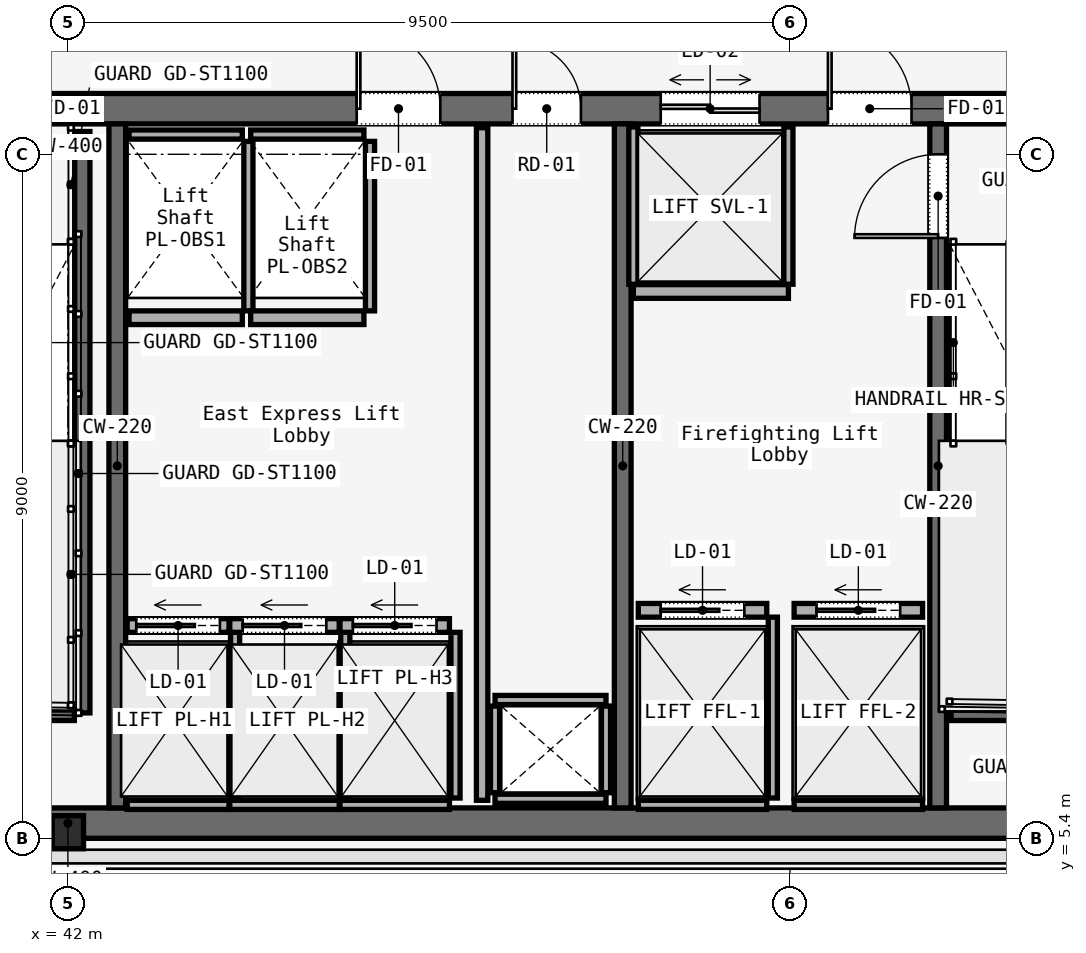
"""IFC4 building model, lengths in metres.
Left out: names, types, materials, properties, quantities, classifications, styles, units other than length and angle.
Written with IfcOpenShell. Run it as: python <this file> out.ifc"""

import sys

from ifc_helpers import new_model, si_unit, direction, frame, frame_2d, origin, origin_2d, place, context, subcontext, project, spatial, rectangle, i_section, extrude, element, fill, save


model = new_model("IFC4")
c1 = context("Model", 3, precision=1e-05, world=origin(), true_north=direction((0.0, 1.0)))
c2 = subcontext(c1, "Body", "Model", "MODEL_VIEW")
j1 = project(units=[si_unit("LENGTHUNIT", "METRE"), si_unit("PLANEANGLEUNIT", "RADIAN")], contexts=[c1])
p1 = place(None, origin())
s1 = spatial("IfcSite", under=j1, at=p1, CompositionType="ELEMENT")
p2 = place(p1, origin())
s2 = spatial("IfcBuilding", under=s1, at=p2, CompositionType="ELEMENT")
p3 = place(p2, frame((0.0, 0.0, 221.8)))
s3 = spatial("IfcBuildingStorey", under=s2, at=p3, CompositionType="ELEMENT", Elevation=221.8)
p4 = place(p3, frame((26.45, 15.0, 0.0), z_axis=(0.0, 0.0, 1.0), x_axis=(1.0, 0.0, 0.0)))
e1 = element("IfcWall", 1, at=p4, inside=s3, PredefinedType="SOLIDWALL", context=c2, shape_type="SweptSolid", body=[
    extrude(rectangle(XDim=31.1, YDim=0.4, at=frame_2d((15.55, 0.0))), origin(), (0.0, 0.0, 1.0), 3.58),
])
p5 = place(p4, frame((1.65, 0.0, 0.0)))
e2 = element("IfcOpeningElement", 2, at=p5, cuts=e1, PredefinedType="OPENING", context=c2, shape_type="SweptSolid", body=[
    extrude(rectangle(XDim=1.1, YDim=2.2, at=frame_2d((0.55, 1.1))), frame((0.0, 0.2, 0.0), z_axis=(0.0, -1.0, 0.0), x_axis=(1.0, 0.0, 0.0)), (0.0, 0.0, 1.0), 0.4),
])
p6 = place(p4, frame((13.65, 0.0, 0.0)))
e3 = element("IfcOpeningElement", 3, at=p6, cuts=e1, PredefinedType="OPENING", context=c2, shape_type="SweptSolid", body=[
    extrude(rectangle(XDim=1.1, YDim=2.2, at=frame_2d((0.55, 1.1))), frame((0.0, 0.2, 0.0), z_axis=(0.0, -1.0, 0.0), x_axis=(1.0, 0.0, 0.0)), (0.0, 0.0, 1.0), 0.4),
])
p7 = place(p4, frame((25.55, 0.0, 0.0)))
e4 = element("IfcOpeningElement", 4, at=p7, cuts=e1, PredefinedType="OPENING", context=c2, shape_type="SweptSolid", body=[
    extrude(rectangle(XDim=1.1, YDim=2.2, at=frame_2d((0.55, 1.1))), frame((0.0, 0.2, 0.0), z_axis=(0.0, -1.0, 0.0), x_axis=(1.0, 0.0, 0.0)), (0.0, 0.0, 1.0), 0.4),
])
p8 = place(p4, frame((19.35, 0.0, 0.0)))
e5 = element("IfcOpeningElement", 5, at=p8, cuts=e1, PredefinedType="OPENING", context=c2, shape_type="SweptSolid", body=[
    extrude(rectangle(XDim=1.1, YDim=2.2, at=frame_2d((0.55, 1.1))), frame((0.0, 0.2, 0.0), z_axis=(0.0, -1.0, 0.0), x_axis=(1.0, 0.0, 0.0)), (0.0, 0.0, 1.0), 0.4),
])
p9 = place(p4, frame((21.4, 0.0, 0.0)))
e6 = element("IfcOpeningElement", 6, at=p9, cuts=e1, PredefinedType="OPENING", context=c2, shape_type="SweptSolid", body=[
    extrude(rectangle(XDim=0.9, YDim=2.1, at=frame_2d((0.45, 1.05))), frame((0.0, 0.2, 0.0), z_axis=(0.0, -1.0, 0.0), x_axis=(1.0, 0.0, 0.0)), (0.0, 0.0, 1.0), 0.4),
])
p10 = place(p4, frame((6.54, 0.0, 0.0)))
e7 = element("IfcOpeningElement", 7, at=p10, cuts=e1, PredefinedType="OPENING", context=c2, shape_type="SweptSolid", body=[
    extrude(rectangle(XDim=0.95, YDim=2.2, at=frame_2d((0.475, 1.1))), frame((0.0, 0.2, 0.0), z_axis=(0.0, -1.0, 0.0), x_axis=(1.0, 0.0, 0.0)), (0.0, 0.0, 1.0), 0.4),
])
p11 = place(p4, frame((10.49, 0.0, 0.0)))
e8 = element("IfcOpeningElement", 8, at=p11, cuts=e1, PredefinedType="OPENING", context=c2, shape_type="SweptSolid", body=[
    extrude(rectangle(XDim=0.95, YDim=2.2, at=frame_2d((0.475, 1.1))), frame((0.0, 0.2, 0.0), z_axis=(0.0, -1.0, 0.0), x_axis=(1.0, 0.0, 0.0)), (0.0, 0.0, 1.0), 0.4),
])
p12 = place(p4, frame((23.35, 0.0, 0.0)))
e9 = element("IfcOpeningElement", 9, at=p12, cuts=e1, PredefinedType="OPENING", context=c2, shape_type="SweptSolid", body=[
    extrude(rectangle(XDim=1.3, YDim=2.3, at=frame_2d((0.65, 1.15))), frame((0.0, 0.2, 0.0), z_axis=(0.0, -1.0, 0.0), x_axis=(1.0, 0.0, 0.0)), (0.0, 0.0, 1.0), 0.4),
])
p13 = place(p3, frame((26.45, 5.6, 0.0), z_axis=(0.0, 0.0, 1.0), x_axis=(1.0, 0.0, 0.0)))
e10 = element("IfcWall", 10, at=p13, inside=s3, PredefinedType="SOLIDWALL", context=c2, shape_type="SweptSolid", body=[
    extrude(rectangle(XDim=31.1, YDim=0.4, at=frame_2d((15.55, 0.0))), origin(), (0.0, 0.0, 1.0), 3.58),
])
for number, where, z_axis, x_axis in (
    (11, (42.65, 5.8, 0.0), (0.0, 0.0, 1.0), (0.0, 1.0, 0.0)),
    (12, (49.3, 5.8, 0.0), (0.0, 0.0, 1.0), (0.0, 1.0, 0.0)),
):
    element("IfcWall", number, at=place(p3, frame(where, z_axis=z_axis, x_axis=x_axis)), inside=s3, PredefinedType="SOLIDWALL", context=c2, shape_type="SweptSolid", body=[
        extrude(rectangle(XDim=9.0, YDim=0.22, at=frame_2d((4.5, 0.0))), origin(), (0.0, 0.0, 1.0), 3.58),
    ])
p14 = place(p3, frame((53.45, 5.8, 0.0), z_axis=(0.0, 0.0, 1.0), x_axis=(0.0, 1.0, 0.0)))
e13 = element("IfcWall", 13, at=p14, inside=s3, PredefinedType="SOLIDWALL", context=c2, shape_type="SweptSolid", body=[
    extrude(rectangle(XDim=9.0, YDim=0.22, at=frame_2d((4.5, 0.0))), origin(), (0.0, 0.0, 1.0), 3.58),
])
p15 = place(p14, frame((7.5, 0.0, 0.0)))
e14 = element("IfcOpeningElement", 14, at=p15, cuts=e13, PredefinedType="OPENING", context=c2, shape_type="SweptSolid", body=[
    extrude(rectangle(XDim=1.1, YDim=2.2, at=frame_2d((0.55, 1.1))), frame((0.0, 0.11, 0.0), z_axis=(0.0, -1.0, 0.0), x_axis=(1.0, 0.0, 0.0)), (0.0, 0.0, 1.0), 0.22),
])
p16 = place(p3, frame((42.0, 5.48, 0.0), z_axis=(0.0, 0.0, 1.0), x_axis=(1.0, 0.0, 0.0)))
e15 = element("IfcColumn", 15, at=p16, inside=s3, PredefinedType="COLUMN", context=c2, shape_type="SweptSolid", body=[
    extrude(i_section(OverallWidth=0.412, OverallDepth=0.435, WebThickness=0.036, FlangeThickness=0.044, FilletRadius=0.015, at=origin_2d()), origin(), (0.0, 0.0, 1.0), 3.58),
])
p17 = place(p3, frame((42.19, 14.7, 0.0), z_axis=(0.0, 0.0, 1.0), x_axis=(0.0, -1.0, 0.0)))
e16 = element("IfcWall", 16, at=p17, inside=s3, PredefinedType="SOLIDWALL", context=c2, shape_type="SweptSolid", body=[
    extrude(rectangle(XDim=7.65, YDim=0.2, at=frame_2d((3.825, 0.0))), origin(), (0.0, 0.0, 1.0), 3.8),
])
for number, where, z_axis, x_axis in (
    (17, (38.97, 7.05, 0.0), (0.0, 0.0, 1.0), (1.0, 0.0, 0.0)),
    (18, (53.62, 7.05, 0.0), (0.0, 0.0, 1.0), (1.0, 0.0, 0.0)),
):
    element("IfcWall", number, at=place(p3, frame(where, z_axis=z_axis, x_axis=x_axis)), inside=s3, PredefinedType="SOLIDWALL", context=c2, shape_type="SweptSolid", body=[
        extrude(rectangle(XDim=3.115, YDim=0.2, at=frame_2d((1.558, 0.0))), origin(), (0.0, 0.0, 1.0), 3.8),
    ])
for number, where, z_axis, x_axis in (
    (19, (47.62, 5.92, 0.0), (0.0, 0.0, 1.0), (1.0, 0.0, 0.0)),
    (20, (47.62, 7.22, 0.0), (0.0, 0.0, 1.0), (1.0, 0.0, 0.0)),
):
    element("IfcWall", number, at=place(p3, frame(where, z_axis=z_axis, x_axis=x_axis)), inside=s3, PredefinedType="SOLIDWALL", context=c2, shape_type="SweptSolid", body=[
        extrude(rectangle(XDim=1.46, YDim=0.12, at=frame_2d((0.73, 0.0))), origin(), (0.0, 0.0, 1.0), 3.01),
    ])
for number, where, z_axis, x_axis in (
    (21, (47.62, 6.0, 0.0), (0.0, 0.0, 1.0), (0.0, 1.0, 0.0)),
    (22, (49.08, 6.0, 0.0), (0.0, 0.0, 1.0), (0.0, 1.0, 0.0)),
):
    element("IfcWall", number, at=place(p3, frame(where, z_axis=z_axis, x_axis=x_axis)), inside=s3, PredefinedType="SOLIDWALL", context=c2, shape_type="SweptSolid", body=[
        extrude(rectangle(XDim=1.14, YDim=0.12, at=frame_2d((0.57, 0.0))), origin(), (0.0, 0.0, 1.0), 3.01),
    ])
p18 = place(p3, frame((47.45, 5.9, 0.0), z_axis=(0.0, 0.0, 1.0), x_axis=(0.0, 1.0, 0.0)))
e23 = element("IfcWall", 23, at=p18, inside=s3, PredefinedType="PARTITIONING", context=c2, shape_type="SweptSolid", body=[
    extrude(rectangle(XDim=8.85, YDim=0.15, at=frame_2d((4.425, 0.0))), origin(), (0.0, 0.0, 1.0), 3.01),
])
p19 = place(p3, frame((42.78, 8.2, 0.0), z_axis=(0.0, 0.0, 1.0), x_axis=(1.0, 0.0, 0.0)))
e24 = element("IfcWall", 24, at=p19, inside=s3, PredefinedType="SOLIDWALL", context=c2, shape_type="SweptSolid", body=[
    extrude(rectangle(XDim=1.34, YDim=0.18, at=frame_2d((0.67, 0.0))), origin(), (0.0, 0.0, 1.0), 3.01),
])
p20 = place(p19, frame((0.12, 0.0, 0.0)))
e25 = element("IfcOpeningElement", 25, at=p20, cuts=e24, PredefinedType="OPENING", context=c2, shape_type="SweptSolid", body=[
    extrude(rectangle(XDim=1.1, YDim=2.2, at=frame_2d((0.55, 1.1))), frame((0.0, 0.09, 0.0), z_axis=(0.0, -1.0, 0.0), x_axis=(1.0, 0.0, 0.0)), (0.0, 0.0, 1.0), 0.18),
])
p21 = place(p3, frame((42.78, 5.84, 0.0), z_axis=(0.0, 0.0, 1.0), x_axis=(1.0, 0.0, 0.0)))
e26 = element("IfcWall", 26, at=p21, inside=s3, PredefinedType="SOLIDWALL", context=c2, shape_type="SweptSolid", body=[
    extrude(rectangle(XDim=1.34, YDim=0.12, at=frame_2d((0.67, 0.0))), origin(), (0.0, 0.0, 1.0), 3.01),
])
p22 = place(p3, frame((44.2, 5.93, 0.0), z_axis=(0.0, 0.0, 1.0), x_axis=(0.0, 1.0, 0.0)))
e27 = element("IfcWall", 27, at=p22, inside=s3, PredefinedType="SOLIDWALL", context=c2, shape_type="SweptSolid", body=[
    extrude(rectangle(XDim=2.18, YDim=0.12, at=frame_2d((1.09, 0.0))), origin(), (0.0, 0.0, 1.0), 3.01),
])
p23 = place(p3, frame((44.13, 8.2, 0.0), z_axis=(0.0, 0.0, 1.0), x_axis=(1.0, 0.0, 0.0)))
e28 = element("IfcWall", 28, at=p23, inside=s3, PredefinedType="SOLIDWALL", context=c2, shape_type="SweptSolid", body=[
    extrude(rectangle(XDim=1.44, YDim=0.18, at=frame_2d((0.72, 0.0))), origin(), (0.0, 0.0, 1.0), 3.01),
])
p24 = place(p23, frame((0.17, 0.0, 0.0)))
e29 = element("IfcOpeningElement", 29, at=p24, cuts=e28, PredefinedType="OPENING", context=c2, shape_type="SweptSolid", body=[
    extrude(rectangle(XDim=1.1, YDim=2.2, at=frame_2d((0.55, 1.1))), frame((0.0, 0.09, 0.0), z_axis=(0.0, -1.0, 0.0), x_axis=(1.0, 0.0, 0.0)), (0.0, 0.0, 1.0), 0.18),
])
p25 = place(p3, frame((44.13, 5.84, 0.0), z_axis=(0.0, 0.0, 1.0), x_axis=(1.0, 0.0, 0.0)))
e30 = element("IfcWall", 30, at=p25, inside=s3, PredefinedType="SOLIDWALL", context=c2, shape_type="SweptSolid", body=[
    extrude(rectangle(XDim=1.44, YDim=0.12, at=frame_2d((0.72, 0.0))), origin(), (0.0, 0.0, 1.0), 3.01),
])
p26 = place(p3, frame((45.65, 5.93, 0.0), z_axis=(0.0, 0.0, 1.0), x_axis=(0.0, 1.0, 0.0)))
e31 = element("IfcWall", 31, at=p26, inside=s3, PredefinedType="SOLIDWALL", context=c2, shape_type="SweptSolid", body=[
    extrude(rectangle(XDim=2.18, YDim=0.12, at=frame_2d((1.09, 0.0))), origin(), (0.0, 0.0, 1.0), 3.01),
])
p27 = place(p3, frame((45.58, 8.2, 0.0), z_axis=(0.0, 0.0, 1.0), x_axis=(1.0, 0.0, 0.0)))
e32 = element("IfcWall", 32, at=p27, inside=s3, PredefinedType="SOLIDWALL", context=c2, shape_type="SweptSolid", body=[
    extrude(rectangle(XDim=1.44, YDim=0.18, at=frame_2d((0.72, 0.0))), origin(), (0.0, 0.0, 1.0), 3.01),
])
p28 = place(p27, frame((0.17, 0.0, 0.0)))
e33 = element("IfcOpeningElement", 33, at=p28, cuts=e32, PredefinedType="OPENING", context=c2, shape_type="SweptSolid", body=[
    extrude(rectangle(XDim=1.1, YDim=2.2, at=frame_2d((0.55, 1.1))), frame((0.0, 0.09, 0.0), z_axis=(0.0, -1.0, 0.0), x_axis=(1.0, 0.0, 0.0)), (0.0, 0.0, 1.0), 0.18),
])
p29 = place(p3, frame((45.58, 5.84, 0.0), z_axis=(0.0, 0.0, 1.0), x_axis=(1.0, 0.0, 0.0)))
e34 = element("IfcWall", 34, at=p29, inside=s3, PredefinedType="SOLIDWALL", context=c2, shape_type="SweptSolid", body=[
    extrude(rectangle(XDim=1.44, YDim=0.12, at=frame_2d((0.72, 0.0))), origin(), (0.0, 0.0, 1.0), 3.01),
])
p30 = place(p3, frame((47.1, 5.93, 0.0), z_axis=(0.0, 0.0, 1.0), x_axis=(0.0, 1.0, 0.0)))
e35 = element("IfcWall", 35, at=p30, inside=s3, PredefinedType="SOLIDWALL", context=c2, shape_type="SweptSolid", body=[
    extrude(rectangle(XDim=2.18, YDim=0.12, at=frame_2d((1.09, 0.0))), origin(), (0.0, 0.0, 1.0), 3.01),
])
p31 = place(p3, frame((42.805, 12.25, 0.0), z_axis=(0.0, 0.0, 1.0), x_axis=(1.0, 0.0, 0.0)))
e36 = element("IfcWall", 36, at=p31, inside=s3, PredefinedType="SOLIDWALL", context=c2, shape_type="SweptSolid", body=[
    extrude(rectangle(XDim=1.49, YDim=0.18, at=frame_2d((0.745, 0.0))), origin(), (0.0, 0.0, 1.0), 3.01),
])
p32 = place(p3, frame((42.805, 14.66, 0.0), z_axis=(0.0, 0.0, 1.0), x_axis=(1.0, 0.0, 0.0)))
e37 = element("IfcWall", 37, at=p32, inside=s3, PredefinedType="SOLIDWALL", context=c2, shape_type="SweptSolid", body=[
    extrude(rectangle(XDim=1.49, YDim=0.12, at=frame_2d((0.745, 0.0))), origin(), (0.0, 0.0, 1.0), 3.01),
])
p33 = place(p3, frame((44.375, 12.34, 0.0), z_axis=(0.0, 0.0, 1.0), x_axis=(0.0, 1.0, 0.0)))
e38 = element("IfcWall", 38, at=p33, inside=s3, PredefinedType="SOLIDWALL", context=c2, shape_type="SweptSolid", body=[
    extrude(rectangle(XDim=2.23, YDim=0.12, at=frame_2d((1.115, 0.0))), origin(), (0.0, 0.0, 1.0), 3.01),
])
p34 = place(p3, frame((44.405, 12.25, 0.0), z_axis=(0.0, 0.0, 1.0), x_axis=(1.0, 0.0, 0.0)))
e39 = element("IfcWall", 39, at=p34, inside=s3, PredefinedType="SOLIDWALL", context=c2, shape_type="SweptSolid", body=[
    extrude(rectangle(XDim=1.49, YDim=0.18, at=frame_2d((0.745, 0.0))), origin(), (0.0, 0.0, 1.0), 3.01),
])
p35 = place(p3, frame((44.405, 14.66, 0.0), z_axis=(0.0, 0.0, 1.0), x_axis=(1.0, 0.0, 0.0)))
e40 = element("IfcWall", 40, at=p35, inside=s3, PredefinedType="SOLIDWALL", context=c2, shape_type="SweptSolid", body=[
    extrude(rectangle(XDim=1.49, YDim=0.12, at=frame_2d((0.745, 0.0))), origin(), (0.0, 0.0, 1.0), 3.01),
])
p36 = place(p3, frame((45.975, 12.34, 0.0), z_axis=(0.0, 0.0, 1.0), x_axis=(0.0, 1.0, 0.0)))
e41 = element("IfcWall", 41, at=p36, inside=s3, PredefinedType="SOLIDWALL", context=c2, shape_type="SweptSolid", body=[
    extrude(rectangle(XDim=2.23, YDim=0.12, at=frame_2d((1.115, 0.0))), origin(), (0.0, 0.0, 1.0), 3.01),
])
p37 = place(p3, frame((49.505, 8.4, 0.0), z_axis=(0.0, 0.0, 1.0), x_axis=(1.0, 0.0, 0.0)))
e42 = element("IfcWall", 42, at=p37, inside=s3, PredefinedType="SOLIDWALL", context=c2, shape_type="SweptSolid", body=[
    extrude(rectangle(XDim=1.69, YDim=0.18, at=frame_2d((0.845, 0.0))), origin(), (0.0, 0.0, 1.0), 3.01),
])
p38 = place(p37, frame((0.295, 0.0, 0.0)))
e43 = element("IfcOpeningElement", 43, at=p38, cuts=e42, PredefinedType="OPENING", context=c2, shape_type="SweptSolid", body=[
    extrude(rectangle(XDim=1.1, YDim=2.2, at=frame_2d((0.55, 1.1))), frame((0.0, 0.09, 0.0), z_axis=(0.0, -1.0, 0.0), x_axis=(1.0, 0.0, 0.0)), (0.0, 0.0, 1.0), 0.18),
])
p39 = place(p3, frame((49.505, 5.84, 0.0), z_axis=(0.0, 0.0, 1.0), x_axis=(1.0, 0.0, 0.0)))
e44 = element("IfcWall", 44, at=p39, inside=s3, PredefinedType="SOLIDWALL", context=c2, shape_type="SweptSolid", body=[
    extrude(rectangle(XDim=1.69, YDim=0.12, at=frame_2d((0.845, 0.0))), origin(), (0.0, 0.0, 1.0), 3.01),
])
p40 = place(p3, frame((51.275, 5.93, 0.0), z_axis=(0.0, 0.0, 1.0), x_axis=(0.0, 1.0, 0.0)))
e45 = element("IfcWall", 45, at=p40, inside=s3, PredefinedType="SOLIDWALL", context=c2, shape_type="SweptSolid", body=[
    extrude(rectangle(XDim=2.38, YDim=0.12, at=frame_2d((1.19, 0.0))), origin(), (0.0, 0.0, 1.0), 3.01),
])
p41 = place(p3, frame((51.555, 8.4, 0.0), z_axis=(0.0, 0.0, 1.0), x_axis=(1.0, 0.0, 0.0)))
e46 = element("IfcWall", 46, at=p41, inside=s3, PredefinedType="SOLIDWALL", context=c2, shape_type="SweptSolid", body=[
    extrude(rectangle(XDim=1.69, YDim=0.18, at=frame_2d((0.845, 0.0))), origin(), (0.0, 0.0, 1.0), 3.01),
])
p42 = place(p41, frame((0.295, 0.0, 0.0)))
e47 = element("IfcOpeningElement", 47, at=p42, cuts=e46, PredefinedType="OPENING", context=c2, shape_type="SweptSolid", body=[
    extrude(rectangle(XDim=1.1, YDim=2.2, at=frame_2d((0.55, 1.1))), frame((0.0, 0.09, 0.0), z_axis=(0.0, -1.0, 0.0), x_axis=(1.0, 0.0, 0.0)), (0.0, 0.0, 1.0), 0.18),
])
p43 = place(p3, frame((51.555, 5.84, 0.0), z_axis=(0.0, 0.0, 1.0), x_axis=(1.0, 0.0, 0.0)))
e48 = element("IfcWall", 48, at=p43, inside=s3, PredefinedType="SOLIDWALL", context=c2, shape_type="SweptSolid", body=[
    extrude(rectangle(XDim=1.69, YDim=0.12, at=frame_2d((0.845, 0.0))), origin(), (0.0, 0.0, 1.0), 3.01),
])
p44 = place(p3, frame((49.44, 12.595, 0.0), z_axis=(0.0, 0.0, 1.0), x_axis=(1.0, 0.0, 0.0)))
e49 = element("IfcWall", 49, at=p44, inside=s3, PredefinedType="SOLIDWALL", context=c2, shape_type="SweptSolid", body=[
    extrude(rectangle(XDim=2.04, YDim=0.18, at=frame_2d((1.02, 0.0))), origin(), (0.0, 0.0, 1.0), 3.01),
])
for number, where, z_axis, x_axis in (
    (50, (49.44, 12.69, 0.0), (0.0, 0.0, 1.0), (0.0, 1.0, 0.0)),
    (51, (51.48, 12.69, 0.0), (0.0, 0.0, 1.0), (0.0, 1.0, 0.0)),
):
    element("IfcWall", number, at=place(p3, frame(where, z_axis=z_axis, x_axis=x_axis)), inside=s3, PredefinedType="SOLIDWALL", context=c2, shape_type="SweptSolid", body=[
        extrude(rectangle(XDim=2.07, YDim=0.12, at=frame_2d((1.035, 0.0))), origin(), (0.0, 0.0, 1.0), 3.01),
    ])
p45 = place(p7, origin())
e52 = element("IfcDoor", 52, at=p45, inside=s3, OperationType="SINGLE_SWING_RIGHT", PredefinedType="DOOR", context=c2, shape_type="SweptSolid", body=[
    extrude(rectangle(XDim=1.1, YDim=2.2, at=frame_2d((0.55, 1.1))), frame((0.0, 0.025, 0.0), z_axis=(0.0, -1.0, 0.0), x_axis=(1.0, 0.0, 0.0)), (0.0, 0.0, 1.0), 0.05),
])
fill(e4, e52)
p46 = place(p8, origin())
e53 = element("IfcDoor", 53, at=p46, inside=s3, OperationType="SINGLE_SWING_LEFT", PredefinedType="DOOR", context=c2, shape_type="SweptSolid", body=[
    extrude(rectangle(XDim=1.1, YDim=2.2, at=frame_2d((0.55, 1.1))), frame((0.0, 0.025, 0.0), z_axis=(0.0, -1.0, 0.0), x_axis=(1.0, 0.0, 0.0)), (0.0, 0.0, 1.0), 0.05),
])
fill(e5, e53)
p47 = place(p9, origin())
e54 = element("IfcDoor", 54, at=p47, inside=s3, OperationType="SINGLE_SWING_LEFT", PredefinedType="DOOR", context=c2, shape_type="SweptSolid", body=[
    extrude(rectangle(XDim=0.9, YDim=2.1, at=frame_2d((0.45, 1.05))), frame((0.0, 0.025, 0.0), z_axis=(0.0, -1.0, 0.0), x_axis=(1.0, 0.0, 0.0)), (0.0, 0.0, 1.0), 0.05),
])
fill(e6, e54)
p48 = place(p15, origin())
e55 = element("IfcDoor", 55, at=p48, inside=s3, OperationType="SINGLE_SWING_LEFT", PredefinedType="DOOR", context=c2, shape_type="SweptSolid", body=[
    extrude(rectangle(XDim=1.1, YDim=2.2, at=frame_2d((0.55, 1.1))), frame((0.0, 0.025, 0.0), z_axis=(0.0, -1.0, 0.0), x_axis=(1.0, 0.0, 0.0)), (0.0, 0.0, 1.0), 0.05),
])
fill(e14, e55)
p49 = place(p20, origin())
e56 = element("IfcDoor", 56, at=p49, inside=s3, OperationType="SLIDING_TO_LEFT", PredefinedType="DOOR", context=c2, shape_type="SweptSolid", body=[
    extrude(rectangle(XDim=1.1, YDim=2.2, at=frame_2d((0.55, 1.1))), frame((0.0, 0.025, 0.0), z_axis=(0.0, -1.0, 0.0), x_axis=(1.0, 0.0, 0.0)), (0.0, 0.0, 1.0), 0.05),
])
fill(e25, e56)
p50 = place(p24, origin())
e57 = element("IfcDoor", 57, at=p50, inside=s3, OperationType="SLIDING_TO_LEFT", PredefinedType="DOOR", context=c2, shape_type="SweptSolid", body=[
    extrude(rectangle(XDim=1.1, YDim=2.2, at=frame_2d((0.55, 1.1))), frame((0.0, 0.025, 0.0), z_axis=(0.0, -1.0, 0.0), x_axis=(1.0, 0.0, 0.0)), (0.0, 0.0, 1.0), 0.05),
])
fill(e29, e57)
p51 = place(p28, origin())
e58 = element("IfcDoor", 58, at=p51, inside=s3, OperationType="SLIDING_TO_LEFT", PredefinedType="DOOR", context=c2, shape_type="SweptSolid", body=[
    extrude(rectangle(XDim=1.1, YDim=2.2, at=frame_2d((0.55, 1.1))), frame((0.0, 0.025, 0.0), z_axis=(0.0, -1.0, 0.0), x_axis=(1.0, 0.0, 0.0)), (0.0, 0.0, 1.0), 0.05),
])
fill(e33, e58)
p52 = place(p38, origin())
e59 = element("IfcDoor", 59, at=p52, inside=s3, OperationType="SLIDING_TO_LEFT", PredefinedType="DOOR", context=c2, shape_type="SweptSolid", body=[
    extrude(rectangle(XDim=1.1, YDim=2.2, at=frame_2d((0.55, 1.1))), frame((0.0, 0.025, 0.0), z_axis=(0.0, -1.0, 0.0), x_axis=(1.0, 0.0, 0.0)), (0.0, 0.0, 1.0), 0.05),
])
fill(e43, e59)
p53 = place(p42, origin())
e60 = element("IfcDoor", 60, at=p53, inside=s3, OperationType="SLIDING_TO_LEFT", PredefinedType="DOOR", context=c2, shape_type="SweptSolid", body=[
    extrude(rectangle(XDim=1.1, YDim=2.2, at=frame_2d((0.55, 1.1))), frame((0.0, 0.025, 0.0), z_axis=(0.0, -1.0, 0.0), x_axis=(1.0, 0.0, 0.0)), (0.0, 0.0, 1.0), 0.05),
])
fill(e47, e60)
p54 = place(p12, origin())
e61 = element("IfcDoor", 61, at=p54, inside=s3, OperationType="DOUBLE_DOOR_SLIDING", PredefinedType="DOOR", context=c2, shape_type="SweptSolid", body=[
    extrude(rectangle(XDim=1.3, YDim=2.3, at=frame_2d((0.65, 1.15))), frame((0.0, 0.025, 0.0), z_axis=(0.0, -1.0, 0.0), x_axis=(1.0, 0.0, 0.0)), (0.0, 0.0, 1.0), 0.05),
])
fill(e9, e61)
save(model, sys.argv[1])
